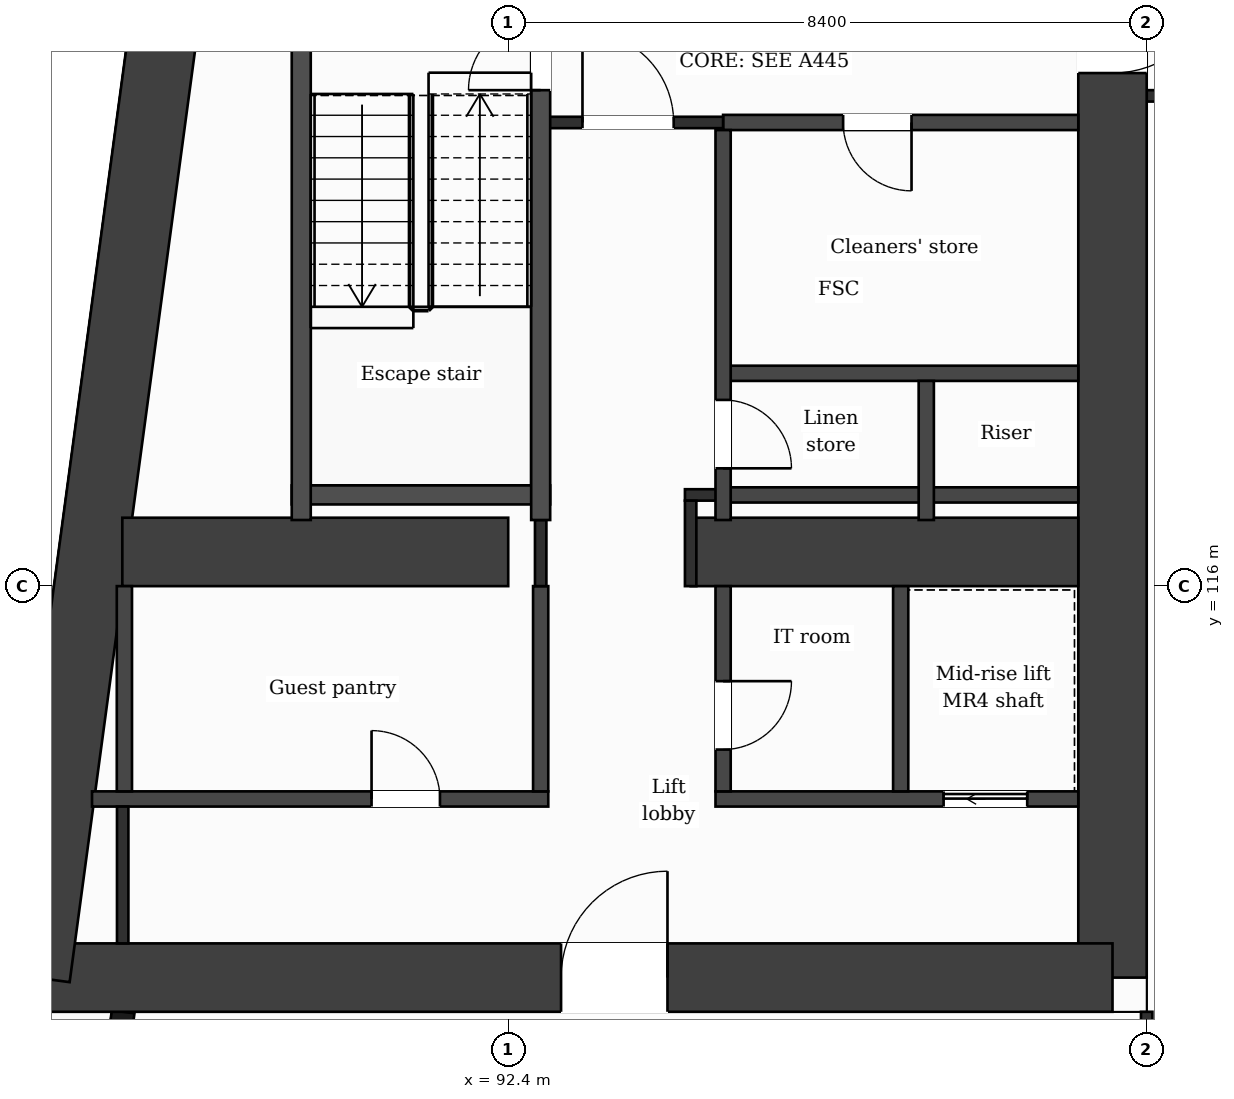
"""IFC4 building model, lengths in metres.
Left out: names, types, materials, properties, quantities, classifications, styles, units other than length and angle.
Written with IfcOpenShell. Run it as: python <this file> out.ifc"""

import sys

from ifc_helpers import new_model, si_unit, direction, frame, frame_2d, origin, place, context, subcontext, project, spatial, rectangle, extrude, element, fill, save


model = new_model("IFC4")
c1 = context("Model", 3, precision=1e-05, world=origin(), true_north=direction((0.0, 1.0)))
c2 = subcontext(c1, "Body", "Model", "MODEL_VIEW")
j1 = project(units=[si_unit("LENGTHUNIT", "METRE"), si_unit("PLANEANGLEUNIT", "RADIAN")], contexts=[c1])
p1 = place(None, origin())
s1 = spatial("IfcSite", under=j1, at=p1, CompositionType="ELEMENT")
p2 = place(p1, origin())
s2 = spatial("IfcBuilding", under=s1, at=p2, CompositionType="ELEMENT")
p3 = place(p2, frame((0.0, 0.0, 184.8)))
s3 = spatial("IfcBuildingStorey", under=s2, at=p3, CompositionType="ELEMENT", Elevation=184.8)
p4 = place(p3, frame((100.35, 131.95, 0.0), z_axis=(0.0, 0.0, 1.0), x_axis=(0.0, -1.0, 0.0)))
e1 = element("IfcWall", 1, at=p4, inside=s3, PredefinedType="SHEAR", context=c2, shape_type="SweptSolid", body=[
    extrude(rectangle(XDim=21.1, YDim=0.9, at=frame_2d((10.55, 0.0))), origin(), (0.0, 0.0, 1.0), 3.7),
])
p5 = place(p4, frame((7.8, 0.0, 0.0)))
e2 = element("IfcOpeningElement", 2, at=p5, cuts=e1, PredefinedType="OPENING", context=c2, shape_type="SweptSolid", body=[
    extrude(rectangle(XDim=1.4, YDim=2.1, at=frame_2d((0.7, 1.05))), frame((0.0, 0.46, 0.0), z_axis=(0.0, -1.0, 0.0), x_axis=(1.0, 0.0, 0.0)), (0.0, 0.0, 1.0), 0.92),
])
p6 = place(p3, frame((100.35, 110.85, 0.0), z_axis=(0.0, 0.0, 1.0), x_axis=(-1.0, 0.0, 0.0)))
e3 = element("IfcWall", 3, at=p6, inside=s3, PredefinedType="SHEAR", context=c2, shape_type="SweptSolid", body=[
    extrude(rectangle(XDim=14.166, YDim=0.9, at=frame_2d((7.083, 0.0))), origin(), (0.0, 0.0, 1.0), 3.7),
])
p7 = place(p6, frame((5.855, 0.0, 0.0)))
e4 = element("IfcOpeningElement", 4, at=p7, cuts=e3, PredefinedType="OPENING", context=c2, shape_type="SweptSolid", body=[
    extrude(rectangle(XDim=1.4, YDim=2.1, at=frame_2d((0.7, 1.05))), frame((0.0, 0.46, 0.0), z_axis=(0.0, -1.0, 0.0), x_axis=(1.0, 0.0, 0.0)), (0.0, 0.0, 1.0), 0.92),
])
p8 = place(p3, frame((86.184, 110.85, 0.0), z_axis=(0.0, 0.0, 1.0), x_axis=(0.133410495943, 0.991060865725, 0.0)))
e5 = element("IfcWall", 5, at=p8, inside=s3, PredefinedType="SHEAR", context=c2, shape_type="SweptSolid", body=[
    extrude(rectangle(XDim=21.29, YDim=0.9, at=frame_2d((10.645, 0.0))), origin(), (0.0, 0.0, 1.0), 3.7),
])
p9 = place(p3, frame((87.323, 116.45, 0.0), z_axis=(0.0, 0.0, 1.0), x_axis=(1.0, 0.0, 0.0)))
e6 = element("IfcWall", 6, at=p9, inside=s3, PredefinedType="SHEAR", context=c2, shape_type="SweptSolid", body=[
    extrude(rectangle(XDim=5.077, YDim=0.9, at=frame_2d((2.539, 0.0))), origin(), (0.0, 0.0, 1.0), 3.7),
])
p10 = place(p3, frame((94.8, 116.45, 0.0), z_axis=(0.0, 0.0, 1.0), x_axis=(1.0, 0.0, 0.0)))
e7 = element("IfcWall", 7, at=p10, inside=s3, PredefinedType="SHEAR", context=c2, shape_type="SweptSolid", body=[
    extrude(rectangle(XDim=5.1, YDim=0.9, at=frame_2d((2.55, 0.0))), origin(), (0.0, 0.0, 1.0), 3.7),
])
p11 = place(p3, frame((87.334, 110.4, 0.0), z_axis=(0.0, 0.0, 1.0), x_axis=(-0.133437175554, -0.991057273915, 0.0)))
e8 = element("IfcWall", 8, at=p11, inside=s3, PredefinedType="SOLIDWALL", context=c2, shape_type="SweptSolid", body=[
    extrude(rectangle(XDim=6.781, YDim=0.3, at=frame_2d((3.39, 0.0))), origin(), (0.0, 0.0, 1.0), 3.38),
])
p12 = place(p11, frame((1.418, 0.0, 0.0)))
e9 = element("IfcOpeningElement", 9, at=p12, cuts=e8, PredefinedType="OPENING", context=c2, shape_type="SweptSolid", body=[
    extrude(rectangle(XDim=1.2, YDim=2.4, at=frame_2d((0.6, 1.2))), frame((0.0, 0.16, 0.0), z_axis=(0.0, -1.0, 0.0), x_axis=(1.0, 0.0, 0.0)), (0.0, 0.0, 1.0), 0.32),
])
p13 = place(p11, frame((4.758, 0.0, 0.9)))
e10 = element("IfcOpeningElement", 10, at=p13, cuts=e8, PredefinedType="OPENING", context=c2, shape_type="SweptSolid", body=[
    extrude(rectangle(XDim=1.2, YDim=2.1, at=frame_2d((0.6, 1.05))), frame((0.0, 0.16, 0.0), z_axis=(0.0, -1.0, 0.0), x_axis=(1.0, 0.0, 0.0)), (0.0, 0.0, 1.0), 0.32),
])
p14 = place(p3, frame((86.924, 113.2, 0.0), z_axis=(0.0, 0.0, 1.0), x_axis=(1.0, 0.0, 0.0)))
e11 = element("IfcWall", 11, at=p14, inside=s3, PredefinedType="PARTITIONING", context=c2, shape_type="SweptSolid", body=[
    extrude(rectangle(XDim=6.003, YDim=0.2, at=frame_2d((3.001, 0.0))), origin(), (0.0, 0.0, 1.0), 3.38),
])
p15 = place(p14, frame((3.678, 0.0, 0.0)))
e12 = element("IfcOpeningElement", 12, at=p15, cuts=e11, PredefinedType="OPENING", context=c2, shape_type="SweptSolid", body=[
    extrude(rectangle(XDim=0.9, YDim=2.1, at=frame_2d((0.45, 1.05))), frame((0.0, 0.11, 0.0), z_axis=(0.0, -1.0, 0.0), x_axis=(1.0, 0.0, 0.0)), (0.0, 0.0, 1.0), 0.22),
])
p16 = place(p3, frame((95.127, 113.2, 0.0), z_axis=(0.0, 0.0, 1.0), x_axis=(1.0, 0.0, 0.0)))
e13 = element("IfcWall", 13, at=p16, inside=s3, PredefinedType="PARTITIONING", context=c2, shape_type="SweptSolid", body=[
    extrude(rectangle(XDim=4.773, YDim=0.2, at=frame_2d((2.386, 0.0))), origin(), (0.0, 0.0, 1.0), 3.38),
])
p17 = place(p16, frame((3.001, 0.0, 0.0)))
e14 = element("IfcOpeningElement", 14, at=p17, cuts=e13, PredefinedType="OPENING", context=c2, shape_type="SweptSolid", body=[
    extrude(rectangle(XDim=1.1, YDim=2.1, at=frame_2d((0.55, 1.05))), frame((0.0, 0.11, 0.0), z_axis=(0.0, -1.0, 0.0), x_axis=(1.0, 0.0, 0.0)), (0.0, 0.0, 1.0), 0.22),
])
p18 = place(p3, frame((95.227, 117.2, 0.0), z_axis=(0.0, 0.0, 1.0), x_axis=(1.0, 0.0, 0.0)))
e15 = element("IfcWall", 15, at=p18, inside=s3, PredefinedType="PARTITIONING", context=c2, shape_type="SweptSolid", body=[
    extrude(rectangle(XDim=4.673, YDim=0.2, at=frame_2d((2.336, 0.0))), origin(), (0.0, 0.0, 1.0), 3.38),
])
p19 = place(p3, frame((94.725, 117.2, 0.0), z_axis=(0.0, 0.0, 1.0), x_axis=(1.0, 0.0, 0.0)))
e16 = element("IfcWall", 16, at=p19, inside=s3, PredefinedType="PARTITIONING", context=c2, shape_type="SweptSolid", body=[
    extrude(rectangle(XDim=0.502, YDim=0.15, at=frame_2d((0.251, 0.0))), origin(), (0.0, 0.0, 1.0), 3.38),
])
p20 = place(p3, frame((89.552, 117.2, 0.0), z_axis=(0.0, 0.0, 1.0), x_axis=(1.0, 0.0, 0.0)))
e17 = element("IfcWall", 17, at=p20, inside=s3, PredefinedType="PARTITIONING", context=c2, shape_type="SweptSolid", body=[
    extrude(rectangle(XDim=3.4, YDim=0.25, at=frame_2d((1.7, 0.0))), origin(), (0.0, 0.0, 1.0), 3.38),
])
p21 = place(p3, frame((95.227, 118.8, 0.0), z_axis=(0.0, 0.0, 1.0), x_axis=(1.0, 0.0, 0.0)))
e18 = element("IfcWall", 18, at=p21, inside=s3, PredefinedType="PARTITIONING", context=c2, shape_type="SweptSolid", body=[
    extrude(rectangle(XDim=4.673, YDim=0.2, at=frame_2d((2.336, 0.0))), origin(), (0.0, 0.0, 1.0), 3.38),
])
p22 = place(p3, frame((95.227, 122.1, 0.0), z_axis=(0.0, 0.0, 1.0), x_axis=(1.0, 0.0, 0.0)))
e19 = element("IfcWall", 19, at=p22, inside=s3, PredefinedType="PARTITIONING", context=c2, shape_type="SweptSolid", body=[
    extrude(rectangle(XDim=4.673, YDim=0.2, at=frame_2d((2.336, 0.0))), origin(), (0.0, 0.0, 1.0), 3.38),
])
p23 = place(p22, frame((1.579, 0.0, 0.0)))
e20 = element("IfcOpeningElement", 20, at=p23, cuts=e19, PredefinedType="OPENING", context=c2, shape_type="SweptSolid", body=[
    extrude(rectangle(XDim=0.9, YDim=2.1, at=frame_2d((0.45, 1.05))), frame((0.0, 0.11, 0.0), z_axis=(0.0, -1.0, 0.0), x_axis=(1.0, 0.0, 0.0)), (0.0, 0.0, 1.0), 0.22),
])
p24 = place(p3, frame((92.827, 122.1, 0.0), z_axis=(0.0, 0.0, 1.0), x_axis=(1.0, 0.0, 0.0)))
e21 = element("IfcWall", 21, at=p24, inside=s3, PredefinedType="PARTITIONING", context=c2, shape_type="SweptSolid", body=[
    extrude(rectangle(XDim=2.4, YDim=0.15, at=frame_2d((1.2, 0.0))), origin(), (0.0, 0.0, 1.0), 3.38),
])
p25 = place(p24, frame((0.55, 0.0, 0.0)))
e22 = element("IfcOpeningElement", 22, at=p25, cuts=e21, PredefinedType="OPENING", context=c2, shape_type="SweptSolid", body=[
    extrude(rectangle(XDim=1.2, YDim=2.1, at=frame_2d((0.6, 1.05))), frame((0.0, 0.085, 0.0), z_axis=(0.0, -1.0, 0.0), x_axis=(1.0, 0.0, 0.0)), (0.0, 0.0, 1.0), 0.17),
])
p26 = place(p3, frame((100.8, 122.45, 0.0), z_axis=(0.0, 0.0, 1.0), x_axis=(1.0, 0.0, 0.0)))
e23 = element("IfcWall", 23, at=p26, inside=s3, PredefinedType="PARTITIONING", context=c2, shape_type="SweptSolid", body=[
    extrude(rectangle(XDim=25.2, YDim=0.15, at=frame_2d((12.6, 0.0))), origin(), (0.0, 0.0, 1.0), 3.38),
])
p27 = place(p3, frame((87.35, 113.3, 0.0), z_axis=(0.0, 0.0, 1.0), x_axis=(0.0, 1.0, 0.0)))
e24 = element("IfcWall", 24, at=p27, inside=s3, PredefinedType="PARTITIONING", context=c2, shape_type="SweptSolid", body=[
    extrude(rectangle(XDim=2.7, YDim=0.2, at=frame_2d((1.35, 0.0))), origin(), (0.0, 0.0, 1.0), 3.38),
])
p28 = place(p3, frame((87.328, 111.3, 0.0), z_axis=(0.0, 0.0, 1.0), x_axis=(0.0, 1.0, 0.0)))
e25 = element("IfcWall", 25, at=p28, inside=s3, PredefinedType="PARTITIONING", context=c2, shape_type="SweptSolid", body=[
    extrude(rectangle(XDim=1.8, YDim=0.15, at=frame_2d((0.9, 0.0))), origin(), (0.0, 0.0, 1.0), 3.38),
])
p29 = place(p3, frame((89.677, 116.87, 0.0), z_axis=(0.0, 0.0, 1.0), x_axis=(0.0, 1.0, 0.0)))
e26 = element("IfcWall", 26, at=p29, inside=s3, PredefinedType="PARTITIONING", context=c2, shape_type="SweptSolid", body=[
    extrude(rectangle(XDim=6.955, YDim=0.25, at=frame_2d((3.478, 0.0))), origin(), (0.0, 0.0, 1.0), 3.38),
])
p30 = place(p3, frame((92.827, 113.3, 0.0), z_axis=(0.0, 0.0, 1.0), x_axis=(0.0, 1.0, 0.0)))
e27 = element("IfcWall", 27, at=p30, inside=s3, PredefinedType="PARTITIONING", context=c2, shape_type="SweptSolid", body=[
    extrude(rectangle(XDim=2.7, YDim=0.2, at=frame_2d((1.35, 0.0))), origin(), (0.0, 0.0, 1.0), 3.38),
])
p31 = place(p3, frame((92.827, 116.0, 0.0), z_axis=(0.0, 0.0, 1.0), x_axis=(0.0, 1.0, 0.0)))
e28 = element("IfcWall", 28, at=p31, inside=s3, PredefinedType="PARTITIONING", context=c2, shape_type="SweptSolid", body=[
    extrude(rectangle(XDim=0.87, YDim=0.15, at=frame_2d((0.435, 0.0))), origin(), (0.0, 0.0, 1.0), 3.38),
])
p32 = place(p3, frame((92.827, 116.87, 0.0), z_axis=(0.0, 0.0, 1.0), x_axis=(0.0, 1.0, 0.0)))
e29 = element("IfcWall", 29, at=p32, inside=s3, PredefinedType="PARTITIONING", context=c2, shape_type="SweptSolid", body=[
    extrude(rectangle(XDim=6.955, YDim=0.25, at=frame_2d((3.478, 0.0))), origin(), (0.0, 0.0, 1.0), 3.38),
])
p33 = place(p32, frame((5.655, 0.0, 0.0)))
e30 = element("IfcOpeningElement", 30, at=p33, cuts=e29, PredefinedType="OPENING", context=c2, shape_type="SweptSolid", body=[
    extrude(rectangle(XDim=0.95, YDim=2.1, at=frame_2d((0.475, 1.05))), frame((0.0, 0.135, 0.0), z_axis=(0.0, -1.0, 0.0), x_axis=(1.0, 0.0, 0.0)), (0.0, 0.0, 1.0), 0.27),
])
p34 = place(p3, frame((94.8, 116.0, 0.0), z_axis=(0.0, 0.0, 1.0), x_axis=(0.0, 1.0, 0.0)))
e31 = element("IfcWall", 31, at=p34, inside=s3, PredefinedType="PARTITIONING", context=c2, shape_type="SweptSolid", body=[
    extrude(rectangle(XDim=1.125, YDim=0.15, at=frame_2d((0.562, 0.0))), origin(), (0.0, 0.0, 1.0), 3.38),
])
p35 = place(p3, frame((95.227, 113.3, 0.0), z_axis=(0.0, 0.0, 1.0), x_axis=(0.0, 1.0, 0.0)))
e32 = element("IfcWall", 32, at=p35, inside=s3, PredefinedType="PARTITIONING", context=c2, shape_type="SweptSolid", body=[
    extrude(rectangle(XDim=2.7, YDim=0.2, at=frame_2d((1.35, 0.0))), origin(), (0.0, 0.0, 1.0), 3.38),
])
p36 = place(p35, frame((0.55, 0.0, 0.0)))
e33 = element("IfcOpeningElement", 33, at=p36, cuts=e32, PredefinedType="OPENING", context=c2, shape_type="SweptSolid", body=[
    extrude(rectangle(XDim=0.9, YDim=2.1, at=frame_2d((0.45, 1.05))), frame((0.0, 0.11, 0.0), z_axis=(0.0, -1.0, 0.0), x_axis=(1.0, 0.0, 0.0)), (0.0, 0.0, 1.0), 0.22),
])
p37 = place(p3, frame((95.227, 116.87, 0.0), z_axis=(0.0, 0.0, 1.0), x_axis=(0.0, 1.0, 0.0)))
e34 = element("IfcWall", 34, at=p37, inside=s3, PredefinedType="PARTITIONING", context=c2, shape_type="SweptSolid", body=[
    extrude(rectangle(XDim=5.13, YDim=0.2, at=frame_2d((2.565, 0.0))), origin(), (0.0, 0.0, 1.0), 3.38),
])
p38 = place(p37, frame((0.68, 0.0, 0.0)))
e35 = element("IfcOpeningElement", 35, at=p38, cuts=e34, PredefinedType="OPENING", context=c2, shape_type="SweptSolid", body=[
    extrude(rectangle(XDim=0.9, YDim=2.1, at=frame_2d((0.45, 1.05))), frame((0.0, 0.11, 0.0), z_axis=(0.0, -1.0, 0.0), x_axis=(1.0, 0.0, 0.0)), (0.0, 0.0, 1.0), 0.22),
])
p39 = place(p3, frame((97.563, 113.3, 0.0), z_axis=(0.0, 0.0, 1.0), x_axis=(0.0, 1.0, 0.0)))
e36 = element("IfcWall", 36, at=p39, inside=s3, PredefinedType="PARTITIONING", context=c2, shape_type="SweptSolid", body=[
    extrude(rectangle(XDim=2.7, YDim=0.2, at=frame_2d((1.35, 0.0))), origin(), (0.0, 0.0, 1.0), 3.38),
])
p40 = place(p3, frame((97.9, 116.87, 0.0), z_axis=(0.0, 0.0, 1.0), x_axis=(0.0, 1.0, 0.0)))
e37 = element("IfcWall", 37, at=p40, inside=s3, PredefinedType="PARTITIONING", context=c2, shape_type="SweptSolid", body=[
    extrude(rectangle(XDim=1.83, YDim=0.2, at=frame_2d((0.915, 0.0))), origin(), (0.0, 0.0, 1.0), 3.38),
])
p41 = place(p3, frame((100.8, 109.075, 0.0), z_axis=(0.0, 0.0, 1.0), x_axis=(0.0, 1.0, 0.0)))
e38 = element("IfcWall", 38, at=p41, inside=s3, PredefinedType="PARTITIONING", context=c2, shape_type="SweptSolid", body=[
    extrude(rectangle(XDim=1.325, YDim=0.15, at=frame_2d((0.663, 0.0))), origin(), (0.0, 0.0, 1.0), 3.38),
])
p42 = place(p25, origin())
e39 = element("IfcDoor", 39, at=p42, inside=s3, OperationType="SINGLE_SWING_LEFT", PredefinedType="DOOR", context=c2, shape_type="SweptSolid", body=[
    extrude(rectangle(XDim=1.2, YDim=2.1, at=frame_2d((0.6, 1.05))), frame((0.0, 0.025, 0.0), z_axis=(0.0, -1.0, 0.0), x_axis=(1.0, 0.0, 0.0)), (0.0, 0.0, 1.0), 0.05),
])
fill(e22, e39)
p43 = place(p23, origin())
e40 = element("IfcDoor", 40, at=p43, inside=s3, OperationType="SINGLE_SWING_RIGHT", PredefinedType="DOOR", context=c2, shape_type="SweptSolid", body=[
    extrude(rectangle(XDim=0.9, YDim=2.1, at=frame_2d((0.45, 1.05))), frame((0.0, 0.025, 0.0), z_axis=(0.0, -1.0, 0.0), x_axis=(1.0, 0.0, 0.0)), (0.0, 0.0, 1.0), 0.05),
])
fill(e20, e40)
p44 = place(p33, origin())
e41 = element("IfcDoor", 41, at=p44, inside=s3, OperationType="SINGLE_SWING_LEFT", PredefinedType="DOOR", context=c2, shape_type="SweptSolid", body=[
    extrude(rectangle(XDim=0.95, YDim=2.1, at=frame_2d((0.475, 1.05))), frame((0.0, 0.025, 0.0), z_axis=(0.0, -1.0, 0.0), x_axis=(1.0, 0.0, 0.0)), (0.0, 0.0, 1.0), 0.05),
])
fill(e30, e41)
p45 = place(p38, origin())
e42 = element("IfcDoor", 42, at=p45, inside=s3, OperationType="SINGLE_SWING_LEFT", PredefinedType="DOOR", context=c2, shape_type="SweptSolid", body=[
    extrude(rectangle(XDim=0.9, YDim=2.1, at=frame_2d((0.45, 1.05))), frame((0.0, 0.025, 0.0), z_axis=(0.0, -1.0, 0.0), x_axis=(1.0, 0.0, 0.0)), (0.0, 0.0, 1.0), 0.05),
])
fill(e35, e42)
p46 = place(p17, origin())
e43 = element("IfcDoor", 43, at=p46, inside=s3, OperationType="SLIDING_TO_LEFT", PredefinedType="DOOR", context=c2, shape_type="SweptSolid", body=[
    extrude(rectangle(XDim=1.1, YDim=2.1, at=frame_2d((0.55, 1.05))), frame((0.0, 0.025, 0.0), z_axis=(0.0, -1.0, 0.0), x_axis=(1.0, 0.0, 0.0)), (0.0, 0.0, 1.0), 0.05),
])
fill(e14, e43)
p47 = place(p15, origin())
e44 = element("IfcDoor", 44, at=p47, inside=s3, OperationType="SINGLE_SWING_LEFT", PredefinedType="DOOR", context=c2, shape_type="SweptSolid", body=[
    extrude(rectangle(XDim=0.9, YDim=2.1, at=frame_2d((0.45, 1.05))), frame((0.0, 0.025, 0.0), z_axis=(0.0, -1.0, 0.0), x_axis=(1.0, 0.0, 0.0)), (0.0, 0.0, 1.0), 0.05),
])
fill(e12, e44)
p48 = place(p36, origin())
e45 = element("IfcDoor", 45, at=p48, inside=s3, OperationType="SINGLE_SWING_RIGHT", PredefinedType="DOOR", context=c2, shape_type="SweptSolid", body=[
    extrude(rectangle(XDim=0.9, YDim=2.1, at=frame_2d((0.45, 1.05))), frame((0.0, 0.025, 0.0), z_axis=(0.0, -1.0, 0.0), x_axis=(1.0, 0.0, 0.0)), (0.0, 0.0, 1.0), 0.05),
])
fill(e33, e45)
p49 = place(p7, origin())
e46 = element("IfcDoor", 46, at=p49, inside=s3, OperationType="SINGLE_SWING_LEFT", PredefinedType="DOOR", context=c2, shape_type="SweptSolid", body=[
    extrude(rectangle(XDim=1.4, YDim=2.1, at=frame_2d((0.7, 1.05))), frame((0.0, 0.025, 0.0), z_axis=(0.0, -1.0, 0.0), x_axis=(1.0, 0.0, 0.0)), (0.0, 0.0, 1.0), 0.05),
])
fill(e4, e46)
p50 = place(p5, origin())
e47 = element("IfcDoor", 47, at=p50, inside=s3, OperationType="SINGLE_SWING_LEFT", PredefinedType="DOOR", context=c2, shape_type="SweptSolid", body=[
    extrude(rectangle(XDim=1.4, YDim=2.1, at=frame_2d((0.7, 1.05))), frame((0.0, 0.025, 0.0), z_axis=(0.0, -1.0, 0.0), x_axis=(1.0, 0.0, 0.0)), (0.0, 0.0, 1.0), 0.05),
])
fill(e2, e47)
save(model, sys.argv[1])
